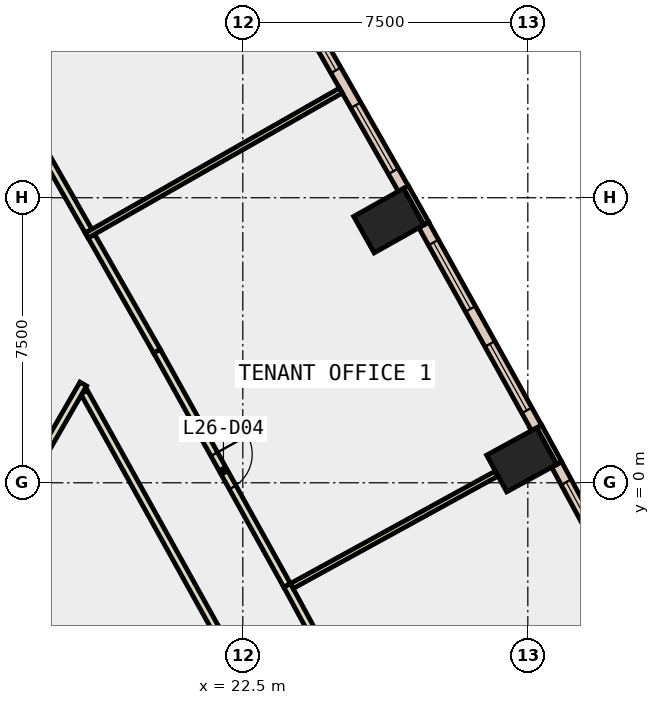
"""IFC4 building model, lengths in metres.
Left out: names, types, materials, properties, quantities, classifications, styles, units other than length and angle.
Written with IfcOpenShell. Run it as: python <this file> out.ifc"""

import sys

from ifc_helpers import new_model, si_unit, direction, frame, frame_2d, origin, origin_2d, place, context, subcontext, project, spatial, rectangle, extrude, element, fill, save


model = new_model("IFC4")
c1 = context("Model", 3, precision=1e-05, world=origin(), true_north=direction((0.0, 1.0)))
c2 = subcontext(c1, "Body", "Model", "MODEL_VIEW")
j1 = project(units=[si_unit("LENGTHUNIT", "METRE"), si_unit("PLANEANGLEUNIT", "RADIAN")], contexts=[c1])
p1 = place(None, origin())
s1 = spatial("IfcSite", under=j1, at=p1, CompositionType="ELEMENT")
p2 = place(p1, origin())
s2 = spatial("IfcBuilding", under=s1, at=p2, CompositionType="ELEMENT")
p3 = place(p2, frame((0.0, 0.0, 120.2)))
s3 = spatial("IfcBuildingStorey", under=s2, at=p3, CompositionType="ELEMENT", Elevation=120.2)
for number, where, z_axis, x_axis in (
    (1, (29.838, 0.604, -0.4), (0.0, 0.0, 1.0), (-0.48, 0.877, 0.0)),
    (2, (26.341, 6.896, -0.4), (0.0, 0.0, 1.0), (-0.49, 0.872, 0.0)),
):
    element("IfcColumn", number, at=place(p3, frame(where, z_axis=z_axis, x_axis=x_axis)), inside=s3, PredefinedType="COLUMN", context=c2, shape_type="SweptSolid", body=[
        extrude(rectangle(XDim=1.1, YDim=1.5, at=origin_2d()), origin(), (0.0, 0.0, 1.0), 4.2),
    ])
p4 = place(p3, frame((30.826, 0.517, 0.0), z_axis=(0.0, 0.0, 1.0), x_axis=(-0.479566870346, 0.877505337229, 0.0)))
e3 = element("IfcWall", 3, at=p4, inside=s3, PredefinedType="STANDARD", context=c2, shape_type="SweptSolid", body=[
    extrude(rectangle(XDim=1.101, YDim=0.15, at=frame_2d((0.55, 0.0))), origin(), (0.0, 0.0, 1.0), 3.8),
])
p5 = place(p3, frame((27.33, 6.821, 0.0), z_axis=(0.0, 0.0, 1.0), x_axis=(-0.490008344094, 0.871717742574, 0.0)))
e4 = element("IfcWall", 4, at=p5, inside=s3, PredefinedType="STANDARD", context=c2, shape_type="SweptSolid", body=[
    extrude(rectangle(XDim=1.1, YDim=0.15, at=frame_2d((0.55, 0.0))), origin(), (0.0, 0.0, 1.0), 3.8),
])
p6 = place(p3, frame((33.667, -4.892, 0.0), z_axis=(0.0, 0.0, 1.0), x_axis=(-0.476097776444, 0.879392351152, 0.0)))
e5 = element("IfcWall", 5, at=p6, inside=s3, PredefinedType="STANDARD", context=c2, shape_type="SweptSolid", body=[
    extrude(rectangle(XDim=6.11, YDim=0.3, at=frame_2d((3.055, 0.0))), origin(), (0.0, 0.0, 1.0), 3.8),
])
p7 = place(p6, frame((0.527, 0.0, 0.9)))
e6 = element("IfcOpeningElement", 6, at=p7, cuts=e5, PredefinedType="OPENING", context=c2, shape_type="SweptSolid", body=[
    extrude(rectangle(XDim=2.0, YDim=2.6, at=frame_2d((1.0, 1.3))), frame((0.0, 0.16, 0.0), z_axis=(0.0, -1.0, 0.0), x_axis=(1.0, 0.0, 0.0)), (0.0, 0.0, 1.0), 0.32),
])
p8 = place(p6, frame((3.582, 0.0, 0.9)))
e7 = element("IfcOpeningElement", 7, at=p8, cuts=e5, PredefinedType="OPENING", context=c2, shape_type="SweptSolid", body=[
    extrude(rectangle(XDim=2.0, YDim=2.6, at=frame_2d((1.0, 1.3))), frame((0.0, 0.16, 0.0), z_axis=(0.0, -1.0, 0.0), x_axis=(1.0, 0.0, 0.0)), (0.0, 0.0, 1.0), 0.32),
])
p9 = place(p3, frame((30.23, 1.444, 0.0), z_axis=(0.0, 0.0, 1.0), x_axis=(-0.485822751649, 0.874057351654, 0.0)))
e8 = element("IfcWall", 8, at=p9, inside=s3, PredefinedType="STANDARD", context=c2, shape_type="SweptSolid", body=[
    extrude(rectangle(XDim=6.109, YDim=0.3, at=frame_2d((3.055, 0.0))), origin(), (0.0, 0.0, 1.0), 3.8),
])
p10 = place(p9, frame((0.527, 0.0, 0.9)))
e9 = element("IfcOpeningElement", 9, at=p10, cuts=e8, PredefinedType="OPENING", context=c2, shape_type="SweptSolid", body=[
    extrude(rectangle(XDim=2.0, YDim=2.6, at=frame_2d((1.0, 1.3))), frame((0.0, 0.16, 0.0), z_axis=(0.0, -1.0, 0.0), x_axis=(1.0, 0.0, 0.0)), (0.0, 0.0, 1.0), 0.32),
])
p11 = place(p9, frame((3.582, 0.0, 0.9)))
e10 = element("IfcOpeningElement", 10, at=p11, cuts=e8, PredefinedType="OPENING", context=c2, shape_type="SweptSolid", body=[
    extrude(rectangle(XDim=2.0, YDim=2.6, at=frame_2d((1.0, 1.3))), frame((0.0, 0.16, 0.0), z_axis=(0.0, -1.0, 0.0), x_axis=(1.0, 0.0, 0.0)), (0.0, 0.0, 1.0), 0.32),
])
p12 = place(p3, frame((26.723, 7.74, 0.0), z_axis=(0.0, 0.0, 1.0), x_axis=(-0.495114366991, 0.868827810098, 0.0)))
e11 = element("IfcWall", 11, at=p12, inside=s3, PredefinedType="STANDARD", context=c2, shape_type="SweptSolid", body=[
    extrude(rectangle(XDim=6.11, YDim=0.3, at=frame_2d((3.055, 0.0))), origin(), (0.0, 0.0, 1.0), 3.8),
])
p13 = place(p12, frame((0.527, 0.0, 0.9)))
e12 = element("IfcOpeningElement", 12, at=p13, cuts=e11, PredefinedType="OPENING", context=c2, shape_type="SweptSolid", body=[
    extrude(rectangle(XDim=2.0, YDim=2.6, at=frame_2d((1.0, 1.3))), frame((0.0, 0.16, 0.0), z_axis=(0.0, -1.0, 0.0), x_axis=(1.0, 0.0, 0.0)), (0.0, 0.0, 1.0), 0.32),
])
p14 = place(p12, frame((3.582, 0.0, 0.9)))
e13 = element("IfcOpeningElement", 13, at=p14, cuts=e11, PredefinedType="OPENING", context=c2, shape_type="SweptSolid", body=[
    extrude(rectangle(XDim=2.0, YDim=2.6, at=frame_2d((1.0, 1.3))), frame((0.0, 0.16, 0.0), z_axis=(0.0, -1.0, 0.0), x_axis=(1.0, 0.0, 0.0)), (0.0, 0.0, 1.0), 0.32),
])
p15 = place(p3, frame((21.773, -3.822, 0.0), z_axis=(0.0, 0.0, 1.0), x_axis=(-0.485826874234, 0.874055060206, 0.0)))
e14 = element("IfcWall", 14, at=p15, inside=s3, PredefinedType="PARTITIONING", context=c2, shape_type="SweptSolid", body=[
    extrude(rectangle(XDim=7.099, YDim=0.2, at=frame_2d((3.55, 0.0))), origin(), (0.0, 0.0, 1.0), 3.8),
])
p16 = place(p3, frame((23.666, -2.698, 0.0), z_axis=(0.0, 0.0, 1.0), x_axis=(0.476195741963, -0.879339306148, 0.0)))
e15 = element("IfcWall", 15, at=p16, inside=s3, PredefinedType="PARTITIONING", context=c2, shape_type="SweptSolid", body=[
    extrude(rectangle(XDim=7.199, YDim=0.2, at=frame_2d((3.599, 0.0))), origin(), (0.0, 0.0, 1.0), 3.8),
])
p17 = place(p16, frame((3.099, 0.0, 0.0)))
e16 = element("IfcOpeningElement", 16, at=p17, cuts=e15, PredefinedType="OPENING", context=c2, shape_type="SweptSolid", body=[
    extrude(rectangle(XDim=1.0, YDim=2.1, at=frame_2d((0.5, 1.05))), frame((0.0, 0.11, 0.0), z_axis=(0.0, -1.0, 0.0), x_axis=(1.0, 0.0, 0.0)), (0.0, 0.0, 1.0), 0.22),
])
p18 = place(p3, frame((18.515, 6.491, 0.0), z_axis=(0.0, 0.0, 1.0), x_axis=(0.495309264725, -0.868716715781, 0.0)))
e17 = element("IfcWall", 17, at=p18, inside=s3, PredefinedType="PARTITIONING", context=c2, shape_type="SweptSolid", body=[
    extrude(rectangle(XDim=3.487, YDim=0.2, at=frame_2d((1.743, 0.0))), origin(), (0.0, 0.0, 1.0), 3.8),
])
p19 = place(p3, frame((20.242, 3.462, 0.0), z_axis=(0.0, 0.0, 1.0), x_axis=(0.485742937917, -0.874101709336, 0.0)))
e18 = element("IfcWall", 18, at=p19, inside=s3, PredefinedType="PARTITIONING", context=c2, shape_type="SweptSolid", body=[
    extrude(rectangle(XDim=7.047, YDim=0.2, at=frame_2d((3.523, 0.0))), origin(), (0.0, 0.0, 1.0), 3.8),
])
p20 = place(p19, frame((3.099, 0.0, 0.0)))
e19 = element("IfcOpeningElement", 19, at=p20, cuts=e18, PredefinedType="OPENING", context=c2, shape_type="SweptSolid", body=[
    extrude(rectangle(XDim=1.0, YDim=2.1, at=frame_2d((0.5, 1.05))), frame((0.0, 0.11, 0.0), z_axis=(0.0, -1.0, 0.0), x_axis=(1.0, 0.0, 0.0)), (0.0, 0.0, 1.0), 0.22),
])
p21 = place(p3, frame((16.714, 9.65, 0.0), z_axis=(0.0, 0.0, 1.0), x_axis=(0.495286549488, -0.868729666753, 0.0)))
e20 = element("IfcWall", 20, at=p21, inside=s3, PredefinedType="PARTITIONING", context=c2, shape_type="SweptSolid", body=[
    extrude(rectangle(XDim=3.487, YDim=0.2, at=frame_2d((1.743, 0.0))), origin(), (0.0, 0.0, 1.0), 3.8),
])
p22 = place(p3, frame((18.301, 2.598, 0.0), z_axis=(0.0, 0.0, 1.0), x_axis=(-0.49997732567, -0.866038494419, 0.0)))
e21 = element("IfcWall", 21, at=p22, inside=s3, PredefinedType="PARTITIONING", context=c2, shape_type="SweptSolid", body=[
    extrude(rectangle(XDim=11.0, YDim=0.2, at=frame_2d((5.5, 0.0))), origin(), (0.0, 0.0, 1.0), 3.8),
])
p23 = place(p3, frame((23.789, -2.716, 0.0), z_axis=(0.0, 0.0, 1.0), x_axis=(0.876716532234, 0.481007403382, 0.0)))
e22 = element("IfcWall", 22, at=p23, inside=s3, PredefinedType="PARTITIONING", context=c2, shape_type="SweptSolid", body=[
    extrude(rectangle(XDim=6.131, YDim=0.15, at=frame_2d((3.065, 0.0))), origin(), (0.0, 0.0, 1.0), 3.8),
])
p24 = place(p3, frame((18.391, 6.506, 0.0), z_axis=(0.0, 0.0, 1.0), x_axis=(0.868738258528, 0.495271479261, 0.0)))
e23 = element("IfcWall", 23, at=p24, inside=s3, PredefinedType="PARTITIONING", context=c2, shape_type="SweptSolid", body=[
    extrude(rectangle(XDim=7.701, YDim=0.15, at=frame_2d((3.85, 0.0))), origin(), (0.0, 0.0, 1.0), 3.8),
])
p25 = place(p8, origin())
e24 = element("IfcWindow", 24, at=p25, inside=s3, PartitioningType="SINGLE_PANEL", PredefinedType="WINDOW", context=c2, shape_type="SweptSolid", body=[
    extrude(rectangle(XDim=2.0, YDim=2.6, at=frame_2d((1.0, 1.3))), frame((0.0, 0.03, 0.0), z_axis=(0.0, -1.0, 0.0), x_axis=(1.0, 0.0, 0.0)), (0.0, 0.0, 1.0), 0.06),
])
fill(e7, e24)
p26 = place(p10, origin())
e25 = element("IfcWindow", 25, at=p26, inside=s3, PartitioningType="SINGLE_PANEL", PredefinedType="WINDOW", context=c2, shape_type="SweptSolid", body=[
    extrude(rectangle(XDim=2.0, YDim=2.6, at=frame_2d((1.0, 1.3))), frame((0.0, 0.03, 0.0), z_axis=(0.0, -1.0, 0.0), x_axis=(1.0, 0.0, 0.0)), (0.0, 0.0, 1.0), 0.06),
])
fill(e9, e25)
p27 = place(p11, origin())
e26 = element("IfcWindow", 26, at=p27, inside=s3, PartitioningType="SINGLE_PANEL", PredefinedType="WINDOW", context=c2, shape_type="SweptSolid", body=[
    extrude(rectangle(XDim=2.0, YDim=2.6, at=frame_2d((1.0, 1.3))), frame((0.0, 0.03, 0.0), z_axis=(0.0, -1.0, 0.0), x_axis=(1.0, 0.0, 0.0)), (0.0, 0.0, 1.0), 0.06),
])
fill(e10, e26)
p28 = place(p13, origin())
e27 = element("IfcWindow", 27, at=p28, inside=s3, PartitioningType="SINGLE_PANEL", PredefinedType="WINDOW", context=c2, shape_type="SweptSolid", body=[
    extrude(rectangle(XDim=2.0, YDim=2.6, at=frame_2d((1.0, 1.3))), frame((0.0, 0.03, 0.0), z_axis=(0.0, -1.0, 0.0), x_axis=(1.0, 0.0, 0.0)), (0.0, 0.0, 1.0), 0.06),
])
fill(e12, e27)
p29 = place(p14, origin())
e28 = element("IfcWindow", 28, at=p29, inside=s3, PartitioningType="SINGLE_PANEL", PredefinedType="WINDOW", context=c2, shape_type="SweptSolid", body=[
    extrude(rectangle(XDim=2.0, YDim=2.6, at=frame_2d((1.0, 1.3))), frame((0.0, 0.03, 0.0), z_axis=(0.0, -1.0, 0.0), x_axis=(1.0, 0.0, 0.0)), (0.0, 0.0, 1.0), 0.06),
])
fill(e13, e28)
p30 = place(p20, origin())
e29 = element("IfcDoor", 29, at=p30, inside=s3, OperationType="SINGLE_SWING_LEFT", PredefinedType="DOOR", context=c2, shape_type="SweptSolid", body=[
    extrude(rectangle(XDim=1.0, YDim=2.1, at=frame_2d((0.5, 1.05))), frame((0.0, 0.025, 0.0), z_axis=(0.0, -1.0, 0.0), x_axis=(1.0, 0.0, 0.0)), (0.0, 0.0, 1.0), 0.05),
])
fill(e19, e29)
save(model, sys.argv[1])
